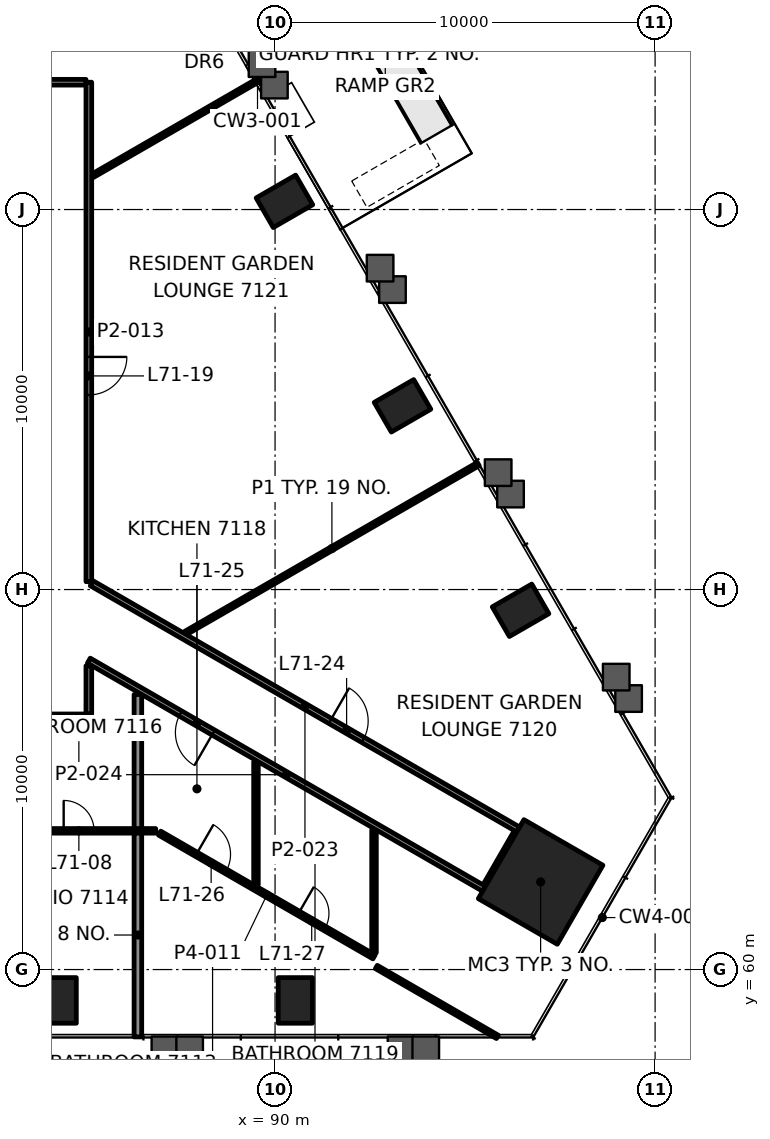
"""IFC4 building model, lengths in metres.
Left out: names, types, materials, properties, quantities, classifications, styles, units other than length and angle.
Written with IfcOpenShell. Run it as: python <this file> out.ifc"""

import sys

from ifc_helpers import new_model, si_unit, direction, frame, frame_2d, origin, origin_2d, place, context, subcontext, project, spatial, rectangle, hollow_rectangle, extrude, element, fill, save


model = new_model("IFC4")
c1 = context("Model", 3, precision=1e-05, world=origin(), true_north=direction((0.0, 1.0)))
c2 = subcontext(c1, "Body", "Model", "MODEL_VIEW")
j1 = project(units=[si_unit("LENGTHUNIT", "METRE"), si_unit("PLANEANGLEUNIT", "RADIAN")], contexts=[c1])
p1 = place(None, origin())
s1 = spatial("IfcSite", under=j1, at=p1, CompositionType="ELEMENT")
p2 = place(p1, origin())
s2 = spatial("IfcBuilding", under=s1, at=p2, CompositionType="ELEMENT")
p3 = place(p2, frame((0.0, 0.0, 295.1)))
s3 = spatial("IfcBuildingStorey", under=s2, at=p3, CompositionType="ELEMENT", Elevation=295.1)
p4 = place(p3, frame((96.988, 62.305, 0.0), z_axis=(0.0, 0.0, 1.0), x_axis=(0.5, 0.866025403784, 0.0)))
e1 = element("IfcColumn", 1, at=p4, inside=s3, PredefinedType="COLUMN", context=c2, shape_type="SweptSolid", body=[
    extrude(rectangle(XDim=2.4, YDim=2.4, at=origin_2d()), origin(), (0.0, 0.0, 1.0), 3.5),
])
for number, where, z_axis, x_axis in (
    (2, (84.32, 59.188, -0.0), (0.0, 0.0, 1.0), (1.0, 0.0, 0.0)),
    (3, (90.533, 59.188, -0.0), (0.0, 0.0, 1.0), (1.0, 0.0, 0.0)),
    (4, (96.461, 69.454, -0.0), (0.0, 0.0, 1.0), (-0.5, 0.866, 0.0)),
    (5, (93.354, 74.835, -0.0), (0.0, 0.0, 1.0), (-0.5, 0.866, 0.0)),
    (6, (90.247, 80.216, -0.0), (0.0, 0.0, 1.0), (-0.5, 0.866, 0.0)),
):
    element("IfcColumn", number, at=place(p3, frame(where, z_axis=z_axis, x_axis=x_axis)), inside=s3, PredefinedType="COLUMN", context=c2, shape_type="SweptSolid", body=[
        extrude(hollow_rectangle(XDim=0.9, YDim=1.2, WallThickness=0.06, at=origin_2d()), origin(), (0.0, 0.0, 1.0), 3.5),
    ])
p5 = place(p3, frame((63.141, 63.65, 0.0), z_axis=(0.0, 0.0, 1.0), x_axis=(1.0, 0.0, 0.0)))
e7 = element("IfcWall", 7, at=p5, inside=s3, PredefinedType="PARTITIONING", context=c2, shape_type="SweptSolid", body=[
    extrude(rectangle(XDim=23.718, YDim=0.12, at=frame_2d((11.859, 0.0))), origin(), (0.0, 0.0, 1.0), 2.7),
])
p6 = place(p5, frame((1.276, 0.0, 0.0)))
e8 = element("IfcOpeningElement", 8, at=p6, cuts=e7, PredefinedType="OPENING", context=c2, shape_type="SweptSolid", body=[
    extrude(rectangle(XDim=0.8, YDim=2.1, at=frame_2d((0.4, 1.05))), frame((0.0, 0.07, 0.0), z_axis=(0.0, -1.0, 0.0), x_axis=(1.0, 0.0, 0.0)), (0.0, 0.0, 1.0), 0.14),
])
p7 = place(p5, frame((3.43, 0.0, 0.0)))
e9 = element("IfcOpeningElement", 9, at=p7, cuts=e7, PredefinedType="OPENING", context=c2, shape_type="SweptSolid", body=[
    extrude(rectangle(XDim=0.9, YDim=2.1, at=frame_2d((0.45, 1.05))), frame((0.0, 0.07, 0.0), z_axis=(0.0, -1.0, 0.0), x_axis=(1.0, 0.0, 0.0)), (0.0, 0.0, 1.0), 0.14),
])
p8 = place(p5, frame((5.715, 0.0, 0.0)))
e10 = element("IfcOpeningElement", 10, at=p8, cuts=e7, PredefinedType="OPENING", context=c2, shape_type="SweptSolid", body=[
    extrude(rectangle(XDim=0.9, YDim=2.1, at=frame_2d((0.45, 1.05))), frame((0.0, 0.07, 0.0), z_axis=(0.0, -1.0, 0.0), x_axis=(1.0, 0.0, 0.0)), (0.0, 0.0, 1.0), 0.14),
])
p9 = place(p5, frame((8.87, 0.0, 0.0)))
e11 = element("IfcOpeningElement", 11, at=p9, cuts=e7, PredefinedType="OPENING", context=c2, shape_type="SweptSolid", body=[
    extrude(rectangle(XDim=0.8, YDim=2.1, at=frame_2d((0.4, 1.05))), frame((0.0, 0.07, 0.0), z_axis=(0.0, -1.0, 0.0), x_axis=(1.0, 0.0, 0.0)), (0.0, 0.0, 1.0), 0.14),
])
p10 = place(p5, frame((11.928, 0.0, 0.0)))
e12 = element("IfcOpeningElement", 12, at=p10, cuts=e7, PredefinedType="OPENING", context=c2, shape_type="SweptSolid", body=[
    extrude(rectangle(XDim=0.9, YDim=2.1, at=frame_2d((0.45, 1.05))), frame((0.0, 0.07, 0.0), z_axis=(0.0, -1.0, 0.0), x_axis=(1.0, 0.0, 0.0)), (0.0, 0.0, 1.0), 0.14),
])
p11 = place(p5, frame((15.083, 0.0, 0.0)))
e13 = element("IfcOpeningElement", 13, at=p11, cuts=e7, PredefinedType="OPENING", context=c2, shape_type="SweptSolid", body=[
    extrude(rectangle(XDim=0.8, YDim=2.1, at=frame_2d((0.4, 1.05))), frame((0.0, 0.07, 0.0), z_axis=(0.0, -1.0, 0.0), x_axis=(1.0, 0.0, 0.0)), (0.0, 0.0, 1.0), 0.14),
])
p12 = place(p5, frame((18.141, 0.0, 0.0)))
e14 = element("IfcOpeningElement", 14, at=p12, cuts=e7, PredefinedType="OPENING", context=c2, shape_type="SweptSolid", body=[
    extrude(rectangle(XDim=0.9, YDim=2.1, at=frame_2d((0.45, 1.05))), frame((0.0, 0.07, 0.0), z_axis=(0.0, -1.0, 0.0), x_axis=(1.0, 0.0, 0.0)), (0.0, 0.0, 1.0), 0.14),
])
p13 = place(p5, frame((21.297, 0.0, 0.0)))
e15 = element("IfcOpeningElement", 15, at=p13, cuts=e7, PredefinedType="OPENING", context=c2, shape_type="SweptSolid", body=[
    extrude(rectangle(XDim=0.8, YDim=2.1, at=frame_2d((0.4, 1.05))), frame((0.0, 0.07, 0.0), z_axis=(0.0, -1.0, 0.0), x_axis=(1.0, 0.0, 0.0)), (0.0, 0.0, 1.0), 0.14),
])
p14 = place(p3, frame((85.1, 66.65, 0.0), z_axis=(0.0, 0.0, 1.0), x_axis=(-1.0, 0.0, 0.0)))
e16 = element("IfcWall", 16, at=p14, inside=s3, PredefinedType="PARTITIONING", context=c2, shape_type="SweptSolid", body=[
    extrude(rectangle(XDim=20.2, YDim=0.15, at=frame_2d((10.1, 0.0))), origin(), (0.0, 0.0, 1.0), 2.7),
])
p15 = place(p14, frame((2.869, 0.0, 0.0)))
e17 = element("IfcOpeningElement", 17, at=p15, cuts=e16, PredefinedType="OPENING", context=c2, shape_type="SweptSolid", body=[
    extrude(rectangle(XDim=1.0, YDim=2.1, at=frame_2d((0.5, 1.05))), frame((0.0, 0.085, 0.0), z_axis=(0.0, -1.0, 0.0), x_axis=(1.0, 0.0, 0.0)), (0.0, 0.0, 1.0), 0.17),
])
p16 = place(p14, frame((9.082, 0.0, 0.0)))
e18 = element("IfcOpeningElement", 18, at=p16, cuts=e16, PredefinedType="OPENING", context=c2, shape_type="SweptSolid", body=[
    extrude(rectangle(XDim=1.0, YDim=2.1, at=frame_2d((0.5, 1.05))), frame((0.0, 0.085, 0.0), z_axis=(0.0, -1.0, 0.0), x_axis=(1.0, 0.0, 0.0)), (0.0, 0.0, 1.0), 0.17),
])
p17 = place(p14, frame((15.296, 0.0, 0.0)))
e19 = element("IfcOpeningElement", 19, at=p17, cuts=e16, PredefinedType="OPENING", context=c2, shape_type="SweptSolid", body=[
    extrude(rectangle(XDim=1.0, YDim=2.1, at=frame_2d((0.5, 1.05))), frame((0.0, 0.085, 0.0), z_axis=(0.0, -1.0, 0.0), x_axis=(1.0, 0.0, 0.0)), (0.0, 0.0, 1.0), 0.17),
])
p18 = place(p3, frame((78.2, 83.35, 0.0), z_axis=(0.0, 0.0, 1.0), x_axis=(1.0, 0.0, 0.0)))
e20 = element("IfcWall", 20, at=p18, inside=s3, PredefinedType="PARTITIONING", context=c2, shape_type="SweptSolid", body=[
    extrude(rectangle(XDim=6.824, YDim=0.15, at=frame_2d((3.412, 0.0))), origin(), (0.0, 0.0, 1.0), 2.7),
])
p19 = place(p18, frame((2.912, 0.0, 0.0)))
e21 = element("IfcOpeningElement", 21, at=p19, cuts=e20, PredefinedType="OPENING", context=c2, shape_type="SweptSolid", body=[
    extrude(rectangle(XDim=1.0, YDim=2.1, at=frame_2d((0.5, 1.05))), frame((0.0, 0.085, 0.0), z_axis=(0.0, -1.0, 0.0), x_axis=(1.0, 0.0, 0.0)), (0.0, 0.0, 1.0), 0.17),
])
p20 = place(p3, frame((87.645, 68.855, 0.0), z_axis=(0.0, 0.0, 1.0), x_axis=(0.866023307551, 0.500003630766, 0.0)))
e22 = element("IfcWall", 22, at=p20, inside=s3, PredefinedType="PARTITIONING", context=c2, shape_type="SweptSolid", body=[
    extrude(rectangle(XDim=8.894, YDim=0.1, at=frame_2d((4.447, 0.0))), origin(), (0.0, 0.0, 1.0), 2.688),
])
p21 = place(p3, frame((85.201, 80.89, 0.0), z_axis=(0.0, 0.0, 1.0), x_axis=(0.866025995923, 0.499998974385, 0.0)))
e23 = element("IfcWall", 23, at=p21, inside=s3, PredefinedType="PARTITIONING", context=c2, shape_type="SweptSolid", body=[
    extrude(rectangle(XDim=4.993, YDim=0.1, at=frame_2d((2.497, 0.0))), origin(), (0.0, 0.0, 1.0), 2.688),
])
p22 = place(p3, frame((95.536, 62.191, 0.0), z_axis=(0.0, 0.0, 1.0), x_axis=(0.500008692254, 0.866020385251, 0.0)))
e24 = element("IfcWall", 24, at=p22, inside=s3, PredefinedType="PARTITIONING", context=c2, shape_type="SweptSolid", body=[
    extrude(rectangle(XDim=1.649, YDim=0.15, at=frame_2d((0.824, 0.0))), origin(), (0.0, 0.0, 1.0), 2.547),
])
p23 = place(p3, frame((92.604, 60.442, 0.0), z_axis=(0.0, 0.0, 1.0), x_axis=(0.0, 1.0, 0.0)))
e25 = element("IfcWall", 25, at=p23, inside=s3, PredefinedType="PARTITIONING", context=c2, shape_type="SweptSolid", body=[
    extrude(rectangle(XDim=3.228, YDim=0.12, at=frame_2d((1.614, 0.0))), origin(), (0.0, 0.0, 1.0), 2.7),
])
p24 = place(p3, frame((89.498, 62.236, 0.0), z_axis=(0.0, 0.0, 1.0), x_axis=(0.0, 1.0, 0.0)))
e26 = element("IfcWall", 26, at=p24, inside=s3, PredefinedType="PARTITIONING", context=c2, shape_type="SweptSolid", body=[
    extrude(rectangle(XDim=3.228, YDim=0.12, at=frame_2d((1.614, 0.0))), origin(), (0.0, 0.0, 1.0), 2.547),
])
p25 = place(p3, frame((86.391, 58.228, 0.0), z_axis=(0.0, 0.0, 1.0), x_axis=(0.0, 1.0, 0.0)))
e27 = element("IfcWall", 27, at=p25, inside=s3, PredefinedType="PARTITIONING", context=c2, shape_type="SweptSolid", body=[
    extrude(rectangle(XDim=5.363, YDim=0.2, at=frame_2d((2.681, 0.0))), origin(), (0.0, 0.0, 1.0), 2.7),
])
p26 = place(p3, frame((85.1, 66.725, 0.0), z_axis=(0.0, 0.0, 1.0), x_axis=(0.0, 1.0, 0.0)))
e28 = element("IfcWall", 28, at=p26, inside=s3, PredefinedType="PARTITIONING", context=c2, shape_type="SweptSolid", body=[
    extrude(rectangle(XDim=1.268, YDim=0.15, at=frame_2d((0.634, 0.0))), origin(), (0.0, 0.0, 1.0), 2.547),
])
p27 = place(p3, frame((85.1, 83.35, 0.0), z_axis=(0.0, 0.0, 1.0), x_axis=(0.0, -1.0, 0.0)))
e29 = element("IfcWall", 29, at=p27, inside=s3, PredefinedType="PARTITIONING", context=c2, shape_type="SweptSolid", body=[
    extrude(rectangle(XDim=13.142, YDim=0.15, at=frame_2d((6.571, 0.0))), origin(), (0.0, 0.0, 1.0), 2.7),
])
p28 = place(p27, frame((7.228, 0.0, 0.0)))
e30 = element("IfcOpeningElement", 30, at=p28, cuts=e29, PredefinedType="OPENING", context=c2, shape_type="SweptSolid", body=[
    extrude(rectangle(XDim=1.0, YDim=2.1, at=frame_2d((0.5, 1.05))), frame((0.0, 0.085, 0.0), z_axis=(0.0, -1.0, 0.0), x_axis=(1.0, 0.0, 0.0)), (0.0, 0.0, 1.0), 0.17),
])
p29 = place(p3, frame((85.175, 70.165, 0.0), z_axis=(0.0, 0.0, 1.0), x_axis=(0.866023706001, -0.500002940635, 0.0)))
e31 = element("IfcWall", 31, at=p29, inside=s3, PredefinedType="PARTITIONING", context=c2, shape_type="SweptSolid", body=[
    extrude(rectangle(XDim=12.959, YDim=0.15, at=frame_2d((6.48, 0.0))), origin(), (0.0, 0.0, 1.0), 2.7),
])
p30 = place(p29, frame((7.246, 0.0, 0.0)))
e32 = element("IfcOpeningElement", 32, at=p30, cuts=e31, PredefinedType="OPENING", context=c2, shape_type="SweptSolid", body=[
    extrude(rectangle(XDim=1.0, YDim=2.1, at=frame_2d((0.5, 1.05))), frame((0.0, 0.085, 0.0), z_axis=(0.0, -1.0, 0.0), x_axis=(1.0, 0.0, 0.0)), (0.0, 0.0, 1.0), 0.17),
])
p31 = place(p3, frame((95.498, 62.126, 0.0), z_axis=(0.0, 0.0, 1.0), x_axis=(-0.866024746207, 0.500001138955, 0.0)))
e33 = element("IfcWall", 33, at=p31, inside=s3, PredefinedType="PARTITIONING", context=c2, shape_type="SweptSolid", body=[
    extrude(rectangle(XDim=12.007, YDim=0.15, at=frame_2d((6.003, 0.0))), origin(), (0.0, 0.0, 1.0), 2.547),
])
p32 = place(p31, frame((8.222, 0.0, 0.0)))
e34 = element("IfcOpeningElement", 34, at=p32, cuts=e33, PredefinedType="OPENING", context=c2, shape_type="SweptSolid", body=[
    extrude(rectangle(XDim=1.0, YDim=2.1, at=frame_2d((0.5, 1.05))), frame((0.0, 0.085, 0.0), z_axis=(0.0, -1.0, 0.0), x_axis=(1.0, 0.0, 0.0)), (0.0, 0.0, 1.0), 0.17),
])
p33 = place(p3, frame((86.963, 63.59, 0.0), z_axis=(0.0, 0.0, 1.0), x_axis=(0.866025198843, -0.500000354968, 0.0)))
e35 = element("IfcWall", 35, at=p33, inside=s3, PredefinedType="PARTITIONING", context=c2, shape_type="SweptSolid", body=[
    extrude(rectangle(XDim=6.515, YDim=0.12, at=frame_2d((3.257, 0.0))), origin(), (0.0, 0.0, 1.0), 2.7),
])
p34 = place(p33, frame((1.115, 0.0, 0.0)))
e36 = element("IfcOpeningElement", 36, at=p34, cuts=e35, PredefinedType="OPENING", context=c2, shape_type="SweptSolid", body=[
    extrude(rectangle(XDim=0.9, YDim=2.1, at=frame_2d((0.45, 1.05))), frame((0.0, 0.07, 0.0), z_axis=(0.0, -1.0, 0.0), x_axis=(1.0, 0.0, 0.0)), (0.0, 0.0, 1.0), 0.14),
])
p35 = place(p33, frame((4.221, 0.0, 0.0)))
e37 = element("IfcOpeningElement", 37, at=p35, cuts=e35, PredefinedType="OPENING", context=c2, shape_type="SweptSolid", body=[
    extrude(rectangle(XDim=0.8, YDim=2.1, at=frame_2d((0.4, 1.05))), frame((0.0, 0.07, 0.0), z_axis=(0.0, -1.0, 0.0), x_axis=(1.0, 0.0, 0.0)), (0.0, 0.0, 1.0), 0.14),
])
p36 = place(p3, frame((95.851, 58.228, 0.0), z_axis=(0.0, 0.0, 1.0), x_axis=(-0.866025356753, 0.50000008146, 0.0)))
e38 = element("IfcWall", 38, at=p36, inside=s3, PredefinedType="PARTITIONING", context=c2, shape_type="SweptSolid", body=[
    extrude(rectangle(XDim=3.679, YDim=0.1, at=frame_2d((1.84, 0.0))), origin(), (0.0, 0.0, 1.0), 2.7),
])
p37 = place(p3, frame((86.391, 63.71, 0.0), z_axis=(0.0, 0.0, 1.0), x_axis=(0.0, 1.0, 0.0)))
e39 = element("IfcWall", 39, at=p37, inside=s3, PredefinedType="PARTITIONING", context=c2, shape_type="SweptSolid", body=[
    extrude(rectangle(XDim=3.528, YDim=0.2, at=frame_2d((1.764, 0.0))), origin(), (0.0, 0.0, 1.0), 2.547),
])
p38 = place(p3, frame((92.217, 80.404, 0.0), z_axis=(0.0, 0.0, 1.0), x_axis=(0.866008176907, 0.50002983664, 0.0)))
e40 = element("IfcWall", 40, at=p38, inside=s3, PredefinedType="SOLIDWALL", context=c2, shape_type="SweptSolid", body=[
    extrude(rectangle(XDim=2.2, YDim=0.8, at=frame_2d((1.1, 0.0))), origin(), (0.0, 0.0, 1.0), 0.9),
])
p39 = place(p13, origin())
e41 = element("IfcDoor", 41, at=p39, inside=s3, OperationType="SINGLE_SWING_LEFT", PredefinedType="DOOR", context=c2, shape_type="SweptSolid", body=[
    extrude(rectangle(XDim=0.8, YDim=2.1, at=frame_2d((0.4, 1.05))), frame((0.0, 0.025, 0.0), z_axis=(0.0, -1.0, 0.0), x_axis=(1.0, 0.0, 0.0)), (0.0, 0.0, 1.0), 0.05),
])
fill(e15, e41)
p40 = place(p28, origin())
e42 = element("IfcDoor", 42, at=p40, inside=s3, OperationType="SINGLE_SWING_LEFT", PredefinedType="DOOR", context=c2, shape_type="SweptSolid", body=[
    extrude(rectangle(XDim=1.0, YDim=2.1, at=frame_2d((0.5, 1.05))), frame((0.0, 0.025, 0.0), z_axis=(0.0, -1.0, 0.0), x_axis=(1.0, 0.0, 0.0)), (0.0, 0.0, 1.0), 0.05),
])
fill(e30, e42)
p41 = place(p30, origin())
e43 = element("IfcDoor", 43, at=p41, inside=s3, OperationType="SINGLE_SWING_RIGHT", PredefinedType="DOOR", context=c2, shape_type="SweptSolid", body=[
    extrude(rectangle(XDim=1.0, YDim=2.1, at=frame_2d((0.5, 1.05))), frame((0.0, 0.025, 0.0), z_axis=(0.0, -1.0, 0.0), x_axis=(1.0, 0.0, 0.0)), (0.0, 0.0, 1.0), 0.05),
])
fill(e32, e43)
p42 = place(p32, origin())
e44 = element("IfcDoor", 44, at=p42, inside=s3, OperationType="SINGLE_SWING_LEFT", PredefinedType="DOOR", context=c2, shape_type="SweptSolid", body=[
    extrude(rectangle(XDim=1.0, YDim=2.1, at=frame_2d((0.5, 1.05))), frame((0.0, 0.025, 0.0), z_axis=(0.0, -1.0, 0.0), x_axis=(1.0, 0.0, 0.0)), (0.0, 0.0, 1.0), 0.05),
])
fill(e34, e44)
p43 = place(p34, origin())
e45 = element("IfcDoor", 45, at=p43, inside=s3, OperationType="SINGLE_SWING_LEFT", PredefinedType="DOOR", context=c2, shape_type="SweptSolid", body=[
    extrude(rectangle(XDim=0.9, YDim=2.1, at=frame_2d((0.45, 1.05))), frame((0.0, 0.025, 0.0), z_axis=(0.0, -1.0, 0.0), x_axis=(1.0, 0.0, 0.0)), (0.0, 0.0, 1.0), 0.05),
])
fill(e36, e45)
p44 = place(p35, origin())
e46 = element("IfcDoor", 46, at=p44, inside=s3, OperationType="SINGLE_SWING_LEFT", PredefinedType="DOOR", context=c2, shape_type="SweptSolid", body=[
    extrude(rectangle(XDim=0.8, YDim=2.1, at=frame_2d((0.4, 1.05))), frame((0.0, 0.025, 0.0), z_axis=(0.0, -1.0, 0.0), x_axis=(1.0, 0.0, 0.0)), (0.0, 0.0, 1.0), 0.05),
])
fill(e37, e46)
save(model, sys.argv[1])
